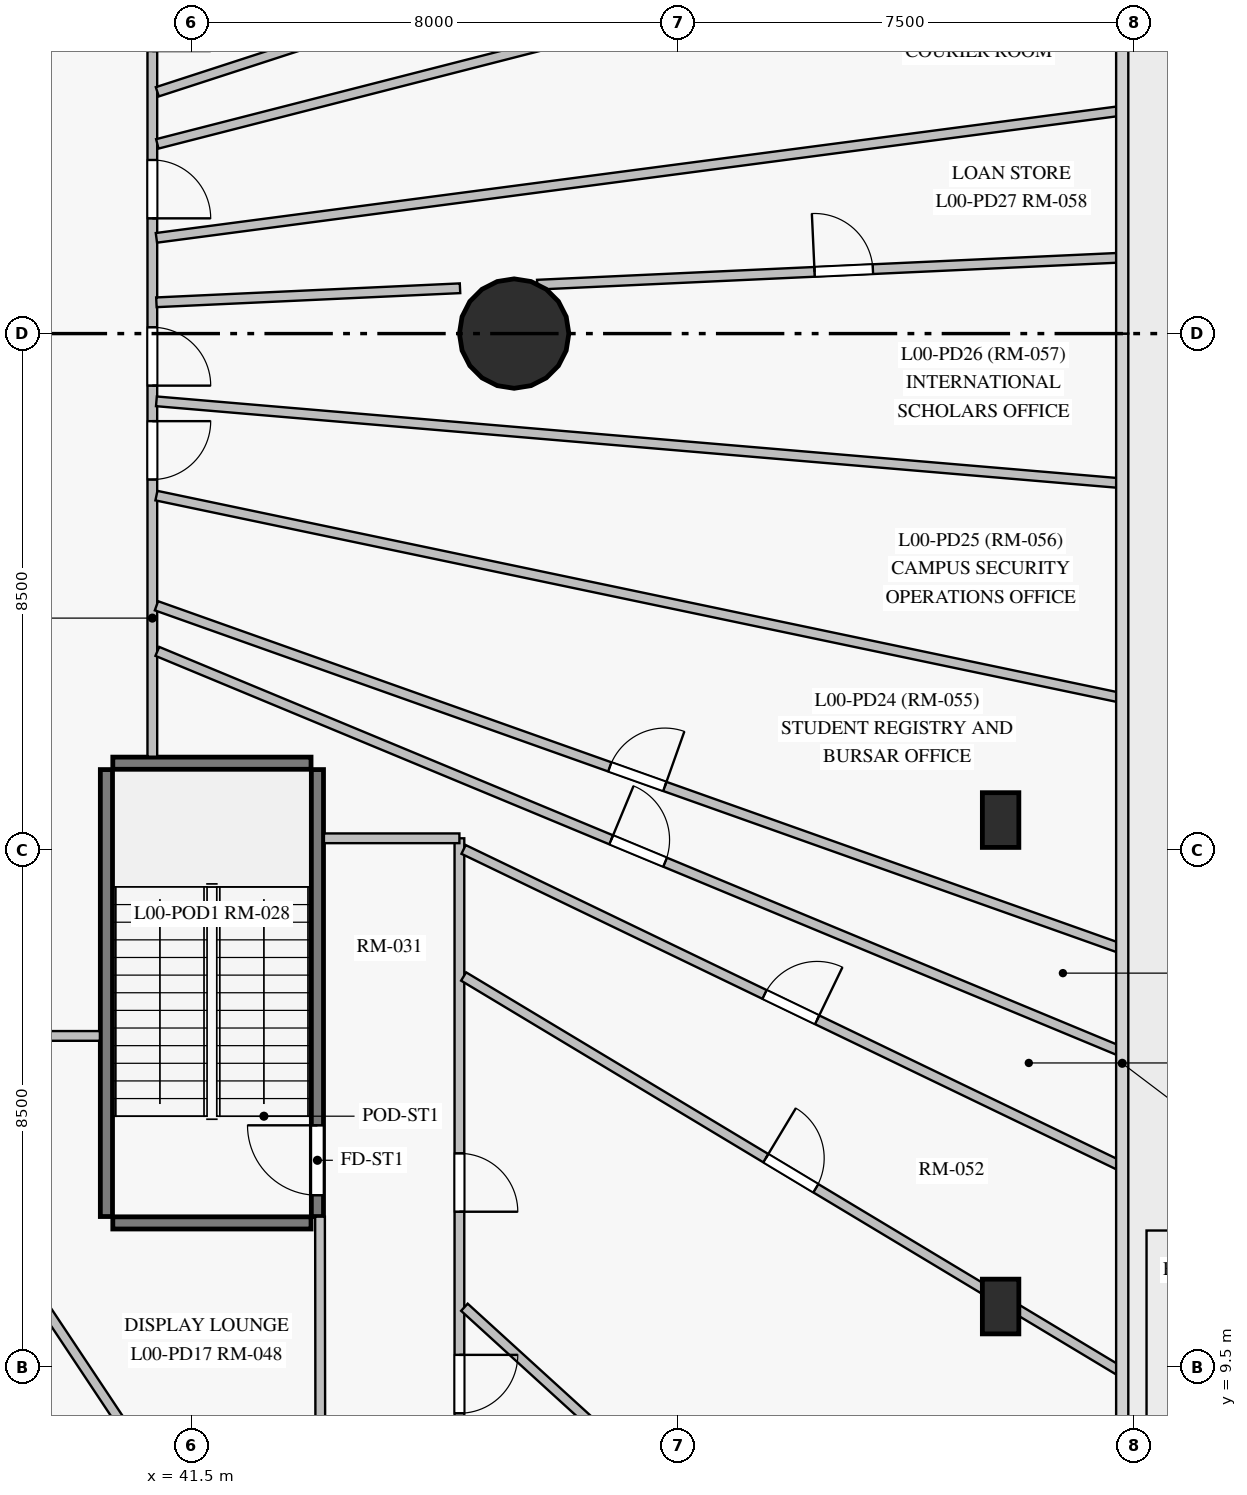
"""IFC4 building model, lengths in metres.
Left out: names, types, materials, properties, quantities, classifications, styles, units other than length and angle.
Written with IfcOpenShell. Run it as: python <this file> out.ifc"""

import sys

from ifc_helpers import new_model, si_unit, direction, frame, frame_2d, origin, origin_with_axes, origin_2d, place, context, subcontext, project, spatial, rectangle, circle, extrude, source, transform, mapped, element, fill, save


model = new_model("IFC4")
c1 = context("Model", 3, precision=1e-05, world=origin(), true_north=direction((0.0, 1.0)))
c2 = subcontext(c1, "Body", "Model", "MODEL_VIEW")
j1 = project(units=[si_unit("LENGTHUNIT", "METRE"), si_unit("PLANEANGLEUNIT", "RADIAN")], contexts=[c1])
p1 = place(None, origin())
s1 = spatial("IfcSite", under=j1, at=p1, CompositionType="ELEMENT")
p2 = place(p1, origin())
s2 = spatial("IfcBuilding", under=s1, at=p2, CompositionType="ELEMENT")
p3 = place(p2, origin())
s3 = spatial("IfcBuildingStorey", under=s2, at=p3, CompositionType="ELEMENT", Elevation=0.0)
m1 = source(origin_with_axes(), c2, "Body", "SweptSolid", [
    extrude(circle(Radius=0.9, at=origin_2d()), origin(), (0.0, 0.0, 1.0), 4.5),
])
p4 = place(p3, frame((46.8, 26.5, 0.0), z_axis=(0.0, 0.0, 1.0), x_axis=(1.0, 0.0, 0.0)))
e1 = element("IfcColumn", 1, at=p4, inside=s3, PredefinedType="COLUMN", context=c2, shape_type="MappedRepresentation", body=[
    mapped(m1, transform((0.0, 0.0, 0.0), scale=1.0)),
])
m2 = source(origin_with_axes(), c2, "Body", "SweptSolid", [
    extrude(rectangle(XDim=0.6, YDim=0.9, at=origin_2d()), origin(), (0.0, 0.0, 1.0), 4.5),
])
for number, where, z_axis, x_axis in (
    (2, (54.8, 10.5, 0.0), (0.0, 0.0, 1.0), (1.0, 0.0, 0.0)),
    (3, (54.8, 18.5, 0.0), (0.0, 0.0, 1.0), (1.0, 0.0, 0.0)),
):
    element("IfcColumn", number, at=place(p3, frame(where, z_axis=z_axis, x_axis=x_axis)), inside=s3, PredefinedType="PILASTER", context=c2, shape_type="MappedRepresentation", body=[
        mapped(m2, transform((0.0, 0.0, 0.0), scale=1.0)),
    ])
p5 = place(p3, frame((40.095, 11.98, 0.0), z_axis=(0.0, 0.0, 1.0), x_axis=(0.0, 1.0, 0.0)))
e4 = element("IfcWall", 4, at=p5, inside=s3, PredefinedType="SHEAR", context=c2, shape_type="SweptSolid", body=[
    extrude(rectangle(XDim=7.35, YDim=0.2, at=frame_2d((3.675, 0.0))), origin(), (0.0, 0.0, 1.0), 4.2),
])
p6 = place(p3, frame((43.565, 11.98, 0.0), z_axis=(0.0, 0.0, 1.0), x_axis=(0.0, 1.0, 0.0)))
e5 = element("IfcWall", 5, at=p6, inside=s3, PredefinedType="SHEAR", context=c2, shape_type="SweptSolid", body=[
    extrude(rectangle(XDim=7.35, YDim=0.2, at=frame_2d((3.675, 0.0))), origin(), (0.0, 0.0, 1.0), 4.2),
])
p7 = place(p6, frame((0.35, 0.0, 0.0)))
e6 = element("IfcOpeningElement", 6, at=p7, cuts=e5, PredefinedType="OPENING", context=c2, shape_type="SweptSolid", body=[
    extrude(rectangle(XDim=1.15, YDim=2.15, at=frame_2d((0.575, 1.075))), frame((0.0, 0.11, 0.0), z_axis=(0.0, -1.0, 0.0), x_axis=(1.0, 0.0, 0.0)), (0.0, 0.0, 1.0), 0.22),
])
for number, where, z_axis, x_axis in (
    (7, (40.2, 11.875, 0.0), (0.0, 0.0, 1.0), (1.0, 0.0, 0.0)),
    (8, (40.2, 19.435, 0.0), (0.0, 0.0, 1.0), (1.0, 0.0, 0.0)),
):
    element("IfcWall", number, at=place(p3, frame(where, z_axis=z_axis, x_axis=x_axis)), inside=s3, PredefinedType="SHEAR", context=c2, shape_type="SweptSolid", body=[
        extrude(rectangle(XDim=3.26, YDim=0.2, at=frame_2d((1.63, 0.0))), origin(), (0.0, 0.0, 1.0), 4.2),
    ])
p8 = place(p3, frame((40.85, 38.05, 0.0), z_axis=(0.0, 0.0, 1.0), x_axis=(0.0, -1.0, 0.0)))
e9 = element("IfcWall", 9, at=p8, inside=s3, PredefinedType="PARTITIONING", context=c2, shape_type="SweptSolid", body=[
    extrude(rectangle(XDim=18.508, YDim=0.16, at=frame_2d((9.254, 0.0))), origin(), (0.0, 0.0, 1.0), 3.25),
])
p9 = place(p8, frame((12.99, 0.0, 0.0)))
e10 = element("IfcOpeningElement", 10, at=p9, cuts=e9, PredefinedType="OPENING", context=c2, shape_type="SweptSolid", body=[
    extrude(rectangle(XDim=0.96, YDim=2.15, at=frame_2d((0.48, 1.075))), frame((0.0, 0.09, 0.0), z_axis=(0.0, -1.0, 0.0), x_axis=(1.0, 0.0, 0.0)), (0.0, 0.0, 1.0), 0.18),
])
p10 = place(p8, frame((11.446, 0.0, 0.0)))
e11 = element("IfcOpeningElement", 11, at=p10, cuts=e9, PredefinedType="OPENING", context=c2, shape_type="SweptSolid", body=[
    extrude(rectangle(XDim=0.96, YDim=2.15, at=frame_2d((0.48, 1.075))), frame((0.0, 0.09, 0.0), z_axis=(0.0, -1.0, 0.0), x_axis=(1.0, 0.0, 0.0)), (0.0, 0.0, 1.0), 0.18),
])
p11 = place(p8, frame((8.695, 0.0, 0.0)))
e12 = element("IfcOpeningElement", 12, at=p11, cuts=e9, PredefinedType="OPENING", context=c2, shape_type="SweptSolid", body=[
    extrude(rectangle(XDim=0.96, YDim=2.15, at=frame_2d((0.48, 1.075))), frame((0.0, 0.09, 0.0), z_axis=(0.0, -1.0, 0.0), x_axis=(1.0, 0.0, 0.0)), (0.0, 0.0, 1.0), 0.18),
])
p12 = place(p8, frame((5.944, 0.0, 0.0)))
e13 = element("IfcOpeningElement", 13, at=p12, cuts=e9, PredefinedType="OPENING", context=c2, shape_type="SweptSolid", body=[
    extrude(rectangle(XDim=0.96, YDim=2.15, at=frame_2d((0.48, 1.075))), frame((0.0, 0.09, 0.0), z_axis=(0.0, -1.0, 0.0), x_axis=(1.0, 0.0, 0.0)), (0.0, 0.0, 1.0), 0.18),
])
p13 = place(p8, frame((2.72, 0.0, 0.0)))
e14 = element("IfcOpeningElement", 14, at=p13, cuts=e9, PredefinedType="OPENING", context=c2, shape_type="SweptSolid", body=[
    extrude(rectangle(XDim=0.96, YDim=2.15, at=frame_2d((0.48, 1.075))), frame((0.0, 0.09, 0.0), z_axis=(0.0, -1.0, 0.0), x_axis=(1.0, 0.0, 0.0)), (0.0, 0.0, 1.0), 0.18),
])
p14 = place(p3, frame((40.932, 21.274, 0.0), z_axis=(0.0, 0.0, 1.0), x_axis=(0.923573591062, -0.383421206889, 0.0)))
e15 = element("IfcWall", 15, at=p14, inside=s3, PredefinedType="PARTITIONING", context=c2, shape_type="SweptSolid", body=[
    extrude(rectangle(XDim=17.149, YDim=0.16, at=frame_2d((8.574, 0.0))), origin(), (0.0, 0.0, 1.0), 4.2),
])
p15 = place(p14, frame((8.082, 0.0, 0.0)))
e16 = element("IfcOpeningElement", 16, at=p15, cuts=e15, PredefinedType="OPENING", context=c2, shape_type="SweptSolid", body=[
    extrude(rectangle(XDim=0.96, YDim=2.15, at=frame_2d((0.48, 1.075))), frame((0.0, 0.09, 0.0), z_axis=(0.0, -1.0, 0.0), x_axis=(1.0, 0.0, 0.0)), (0.0, 0.0, 1.0), 0.18),
])
p16 = place(p3, frame((40.918, 22.024, 0.0), z_axis=(0.0, 0.0, 1.0), x_axis=(0.942274220907, -0.334842190613, 0.0)))
e17 = element("IfcWall", 17, at=p16, inside=s3, PredefinedType="PARTITIONING", context=c2, shape_type="SweptSolid", body=[
    extrude(rectangle(XDim=16.824, YDim=0.16, at=frame_2d((8.412, 0.0))), origin(), (0.0, 0.0, 1.0), 4.2),
])
p17 = place(p16, frame((7.912, 0.0, 0.0)))
e18 = element("IfcOpeningElement", 18, at=p17, cuts=e17, PredefinedType="OPENING", context=c2, shape_type="SweptSolid", body=[
    extrude(rectangle(XDim=0.96, YDim=2.15, at=frame_2d((0.48, 1.075))), frame((0.0, 0.09, 0.0), z_axis=(0.0, -1.0, 0.0), x_axis=(1.0, 0.0, 0.0)), (0.0, 0.0, 1.0), 0.18),
])
p18 = place(p3, frame((40.932, 30.476, 0.0), z_axis=(0.0, 0.0, 1.0), x_axis=(0.951055611127, 0.309019780181, 0.0)))
e19 = element("IfcWall", 19, at=p18, inside=s3, PredefinedType="PARTITIONING", context=c2, shape_type="SweptSolid", body=[
    extrude(rectangle(XDim=16.655, YDim=0.16, at=frame_2d((8.328, 0.0))), origin(), (0.0, 0.0, 1.0), 3.7),
])
p19 = place(p3, frame((40.932, 29.62, 0.0), z_axis=(0.0, 0.0, 1.0), x_axis=(0.968775770521, 0.247938513451, 0.0)))
e20 = element("IfcWall", 20, at=p19, inside=s3, PredefinedType="PARTITIONING", context=c2, shape_type="SweptSolid", body=[
    extrude(rectangle(XDim=16.352, YDim=0.16, at=frame_2d((8.176, 0.0))), origin(), (0.0, 0.0, 1.0), 3.7),
])
p20 = place(p19, frame((7.683, 0.0, 0.0)))
e21 = element("IfcOpeningElement", 21, at=p20, cuts=e20, PredefinedType="OPENING", context=c2, shape_type="SweptSolid", body=[
    extrude(rectangle(XDim=0.96, YDim=2.15, at=frame_2d((0.48, 1.075))), frame((0.0, 0.09, 0.0), z_axis=(0.0, -1.0, 0.0), x_axis=(1.0, 0.0, 0.0)), (0.0, 0.0, 1.0), 0.18),
])
p21 = place(p3, frame((45.9, 18.2, 0.0), z_axis=(0.0, 0.0, 1.0), x_axis=(0.0, -1.0, 0.0)))
e22 = element("IfcWall", 22, at=p21, inside=s3, PredefinedType="PARTITIONING", context=c2, shape_type="SweptSolid", body=[
    extrude(rectangle(XDim=16.235, YDim=0.16, at=frame_2d((8.117, 0.0))), origin(), (0.0, 0.0, 1.0), 4.2),
])
p22 = place(p21, frame((11.935, 0.0, 0.0)))
e23 = element("IfcOpeningElement", 23, at=p22, cuts=e22, PredefinedType="OPENING", context=c2, shape_type="SweptSolid", body=[
    extrude(rectangle(XDim=0.96, YDim=2.15, at=frame_2d((0.48, 1.075))), frame((0.0, 0.09, 0.0), z_axis=(0.0, -1.0, 0.0), x_axis=(1.0, 0.0, 0.0)), (0.0, 0.0, 1.0), 0.18),
])
p23 = place(p21, frame((8.495, 0.0, 0.0)))
e24 = element("IfcOpeningElement", 24, at=p23, cuts=e22, PredefinedType="OPENING", context=c2, shape_type="SweptSolid", body=[
    extrude(rectangle(XDim=0.96, YDim=2.15, at=frame_2d((0.48, 1.075))), frame((0.0, 0.09, 0.0), z_axis=(0.0, -1.0, 0.0), x_axis=(1.0, 0.0, 0.0)), (0.0, 0.0, 1.0), 0.18),
])
p24 = place(p21, frame((5.181, 0.0, 0.0)))
e25 = element("IfcOpeningElement", 25, at=p24, cuts=e22, PredefinedType="OPENING", context=c2, shape_type="SweptSolid", body=[
    extrude(rectangle(XDim=0.96, YDim=2.15, at=frame_2d((0.48, 1.075))), frame((0.0, 0.09, 0.0), z_axis=(0.0, -1.0, 0.0), x_axis=(1.0, 0.0, 0.0)), (0.0, 0.0, 1.0), 0.18),
])
p25 = place(p3, frame((40.917, 23.835, 0.0), z_axis=(0.0, 0.0, 1.0), x_axis=(0.978723393047, -0.205184112209, 0.0)))
e26 = element("IfcWall", 26, at=p25, inside=s3, PredefinedType="PARTITIONING", context=c2, shape_type="SweptSolid", body=[
    extrude(rectangle(XDim=16.201, YDim=0.16, at=frame_2d((8.101, 0.0))), origin(), (0.0, 0.0, 1.0), 3.7),
])
p26 = place(p3, frame((40.917, 28.074, 0.0), z_axis=(0.0, 0.0, 1.0), x_axis=(0.991445045126, 0.130524796478, 0.0)))
e27 = element("IfcWall", 27, at=p26, inside=s3, PredefinedType="PARTITIONING", context=c2, shape_type="SweptSolid", body=[
    extrude(rectangle(XDim=15.994, YDim=0.16, at=frame_2d((7.997, 0.0))), origin(), (0.0, 0.0, 1.0), 3.7),
])
p27 = place(p3, frame((40.917, 25.386, 0.0), z_axis=(0.0, 0.0, 1.0), x_axis=(0.996417423624, -0.084571377535, 0.0)))
e28 = element("IfcWall", 28, at=p27, inside=s3, PredefinedType="PARTITIONING", context=c2, shape_type="SweptSolid", body=[
    extrude(rectangle(XDim=15.915, YDim=0.16, at=frame_2d((7.958, 0.0))), origin(), (0.0, 0.0, 1.0), 3.7),
])
p28 = place(p3, frame((34.032, 14.868, 0.0), z_axis=(0.0, 0.0, 1.0), x_axis=(0.433724291506, -0.901045636445, 0.0)))
e29 = element("IfcWall", 29, at=p28, inside=s3, PredefinedType="PARTITIONING", context=c2, shape_type="SweptSolid", body=[
    extrude(rectangle(XDim=14.468, YDim=0.16, at=frame_2d((7.234, 0.0))), origin(), (0.0, 0.0, 1.0), 4.2),
])
p29 = place(p3, frame((39.988, 14.95, 0.0), z_axis=(0.0, 0.0, 1.0), x_axis=(-1.0, 0.0, 0.0)))
e30 = element("IfcWall", 30, at=p29, inside=s3, PredefinedType="PARTITIONING", context=c2, shape_type="SweptSolid", body=[
    extrude(rectangle(XDim=14.388, YDim=0.16, at=frame_2d((7.194, 0.0))), origin(), (0.0, 0.0, 1.0), 4.2),
])
p30 = place(p29, frame((10.19, 0.0, 0.0)))
e31 = element("IfcOpeningElement", 31, at=p30, cuts=e30, PredefinedType="OPENING", context=c2, shape_type="SweptSolid", body=[
    extrude(rectangle(XDim=0.96, YDim=2.15, at=frame_2d((0.48, 1.075))), frame((0.0, 0.09, 0.0), z_axis=(0.0, -1.0, 0.0), x_axis=(1.0, 0.0, 0.0)), (0.0, 0.0, 1.0), 0.18),
])
p31 = place(p29, frame((6.878, 0.0, 0.0)))
e32 = element("IfcOpeningElement", 32, at=p31, cuts=e30, PredefinedType="OPENING", context=c2, shape_type="SweptSolid", body=[
    extrude(rectangle(XDim=0.96, YDim=2.15, at=frame_2d((0.48, 1.075))), frame((0.0, 0.09, 0.0), z_axis=(0.0, -1.0, 0.0), x_axis=(1.0, 0.0, 0.0)), (0.0, 0.0, 1.0), 0.18),
])
p32 = place(p29, frame((4.595, 0.0, 0.0)))
e33 = element("IfcOpeningElement", 33, at=p32, cuts=e30, PredefinedType="OPENING", context=c2, shape_type="SweptSolid", body=[
    extrude(rectangle(XDim=0.96, YDim=2.15, at=frame_2d((0.48, 1.075))), frame((0.0, 0.09, 0.0), z_axis=(0.0, -1.0, 0.0), x_axis=(1.0, 0.0, 0.0)), (0.0, 0.0, 1.0), 0.18),
])
p33 = place(p29, frame((2.312, 0.0, 0.0)))
e34 = element("IfcOpeningElement", 34, at=p33, cuts=e30, PredefinedType="OPENING", context=c2, shape_type="SweptSolid", body=[
    extrude(rectangle(XDim=0.96, YDim=2.15, at=frame_2d((0.48, 1.075))), frame((0.0, 0.09, 0.0), z_axis=(0.0, -1.0, 0.0), x_axis=(1.0, 0.0, 0.0)), (0.0, 0.0, 1.0), 0.18),
])
p34 = place(p3, frame((36.156, 14.881, 0.0), z_axis=(0.0, 0.0, 1.0), x_axis=(0.553761322164, -0.832675445822, 0.0)))
e35 = element("IfcWall", 35, at=p34, inside=s3, PredefinedType="PARTITIONING", context=c2, shape_type="SweptSolid", body=[
    extrude(rectangle(XDim=13.327, YDim=0.16, at=frame_2d((6.664, 0.0))), origin(), (0.0, 0.0, 1.0), 4.2),
])
p35 = place(p3, frame((45.982, 10.488, 0.0), z_axis=(0.0, 0.0, 1.0), x_axis=(0.73914139053, -0.673550298646, 0.0)))
e36 = element("IfcWall", 36, at=p35, inside=s3, PredefinedType="PARTITIONING", context=c2, shape_type="SweptSolid", body=[
    extrude(rectangle(XDim=12.83, YDim=0.16, at=frame_2d((6.415, 0.0))), origin(), (0.0, 0.0, 1.0), 4.2),
])
p36 = place(p3, frame((45.969, 15.927, 0.0), z_axis=(0.0, 0.0, 1.0), x_axis=(0.857034319892, -0.515259327453, 0.0)))
e37 = element("IfcWall", 37, at=p36, inside=s3, PredefinedType="PARTITIONING", context=c2, shape_type="SweptSolid", body=[
    extrude(rectangle(XDim=12.598, YDim=0.16, at=frame_2d((6.299, 0.0))), origin(), (0.0, 0.0, 1.0), 4.2),
])
p37 = place(p36, frame((5.799, 0.0, 0.0)))
e38 = element("IfcOpeningElement", 38, at=p37, cuts=e37, PredefinedType="OPENING", context=c2, shape_type="SweptSolid", body=[
    extrude(rectangle(XDim=0.96, YDim=2.15, at=frame_2d((0.48, 1.075))), frame((0.0, 0.09, 0.0), z_axis=(0.0, -1.0, 0.0), x_axis=(1.0, 0.0, 0.0)), (0.0, 0.0, 1.0), 0.18),
])
p38 = place(p3, frame((45.969, 18.017, 0.0), z_axis=(0.0, 0.0, 1.0), x_axis=(0.900884595161, -0.434058689813, 0.0)))
e39 = element("IfcWall", 39, at=p38, inside=s3, PredefinedType="PARTITIONING", context=c2, shape_type="SweptSolid", body=[
    extrude(rectangle(XDim=11.988, YDim=0.16, at=frame_2d((5.994, 0.0))), origin(), (0.0, 0.0, 1.0), 4.2),
])
p39 = place(p38, frame((5.494, 0.0, 0.0)))
e40 = element("IfcOpeningElement", 40, at=p39, cuts=e39, PredefinedType="OPENING", context=c2, shape_type="SweptSolid", body=[
    extrude(rectangle(XDim=0.96, YDim=2.15, at=frame_2d((0.48, 1.075))), frame((0.0, 0.09, 0.0), z_axis=(0.0, -1.0, 0.0), x_axis=(1.0, 0.0, 0.0)), (0.0, 0.0, 1.0), 0.18),
])
p40 = place(p3, frame((43.62, 1.965, 0.0), z_axis=(0.0, 0.0, 1.0), x_axis=(-0.001219154463, 0.999999256831, 0.0)))
e41 = element("IfcWall", 41, at=p40, inside=s3, PredefinedType="PARTITIONING", context=c2, shape_type="SweptSolid", body=[
    extrude(rectangle(XDim=10.013, YDim=0.16, at=frame_2d((5.006, 0.0))), origin(), (0.0, 0.0, 1.0), 4.2),
])
p41 = place(p40, frame((4.305, 0.0, 0.0)))
e42 = element("IfcOpeningElement", 42, at=p41, cuts=e41, PredefinedType="OPENING", context=c2, shape_type="SweptSolid", body=[
    extrude(rectangle(XDim=0.96, YDim=2.15, at=frame_2d((0.48, 1.075))), frame((0.0, 0.09, 0.0), z_axis=(0.0, -1.0, 0.0), x_axis=(1.0, 0.0, 0.0)), (0.0, 0.0, 1.0), 0.18),
])
p42 = place(p3, frame((47.18, 27.304, 0.0), z_axis=(0.0, 0.0, 1.0), x_axis=(0.998931741593, 0.04621012484, 0.0)))
e43 = element("IfcWall", 43, at=p42, inside=s3, PredefinedType="PARTITIONING", context=c2, shape_type="SweptSolid", body=[
    extrude(rectangle(XDim=9.605, YDim=0.16, at=frame_2d((4.802, 0.0))), origin(), (0.0, 0.0, 1.0), 3.7),
])
p43 = place(p42, frame((4.565, 0.0, 0.0)))
e44 = element("IfcOpeningElement", 44, at=p43, cuts=e43, PredefinedType="OPENING", context=c2, shape_type="SweptSolid", body=[
    extrude(rectangle(XDim=0.96, YDim=2.15, at=frame_2d((0.48, 1.075))), frame((0.0, 0.09, 0.0), z_axis=(0.0, -1.0, 0.0), x_axis=(1.0, 0.0, 0.0)), (0.0, 0.0, 1.0), 0.18),
])
p44 = place(p3, frame((40.917, 27.014, 0.0), z_axis=(0.0, 0.0, 1.0), x_axis=(0.998931863104, 0.046207498044, 0.0)))
e45 = element("IfcWall", 45, at=p44, inside=s3, PredefinedType="PARTITIONING", context=c2, shape_type="SweptSolid", body=[
    extrude(rectangle(XDim=4.998, YDim=0.16, at=frame_2d((2.499, 0.0))), origin(), (0.0, 0.0, 1.0), 3.25),
])
p45 = place(p3, frame((43.672, 18.2, 0.0), z_axis=(0.0, 0.0, 1.0), x_axis=(1.0, 0.0, 0.0)))
e46 = element("IfcWall", 46, at=p45, inside=s3, PredefinedType="PARTITIONING", context=c2, shape_type="SweptSolid", body=[
    extrude(rectangle(XDim=2.228, YDim=0.16, at=frame_2d((1.114, 0.0))), origin(), (0.0, 0.0, 1.0), 4.2),
])
m3 = source(origin_with_axes(), c2, "Body", "SweptSolid", [
    extrude(rectangle(XDim=1.15, YDim=2.15, at=frame_2d((0.575, 1.075))), frame((0.0, 0.025, 0.0), z_axis=(0.0, -1.0, 0.0), x_axis=(1.0, 0.0, 0.0)), (0.0, 0.0, 1.0), 0.05),
])
p46 = place(p7, origin())
e47 = element("IfcDoor", 47, at=p46, inside=s3, OperationType="SINGLE_SWING_RIGHT", PredefinedType="DOOR", context=c2, shape_type="MappedRepresentation", body=[
    mapped(m3, transform((0.0, 0.0, 0.0), scale=1.0)),
])
fill(e6, e47)
m4 = source(origin_with_axes(), c2, "Body", "SweptSolid", [
    extrude(rectangle(XDim=0.96, YDim=2.15, at=frame_2d((0.48, 1.075))), frame((0.0, 0.025, 0.0), z_axis=(0.0, -1.0, 0.0), x_axis=(1.0, 0.0, 0.0)), (0.0, 0.0, 1.0), 0.05),
])
p47 = place(p23, origin())
e48 = element("IfcDoor", 48, at=p47, inside=s3, OperationType="SINGLE_SWING_LEFT", PredefinedType="DOOR", context=c2, shape_type="MappedRepresentation", body=[
    mapped(m4, transform((0.0, 0.0, 0.0), scale=1.0)),
])
fill(e24, e48)
p48 = place(p24, origin())
e49 = element("IfcDoor", 49, at=p48, inside=s3, OperationType="SINGLE_SWING_RIGHT", PredefinedType="DOOR", context=c2, shape_type="MappedRepresentation", body=[
    mapped(m4, transform((0.0, 0.0, 0.0), scale=1.0)),
])
fill(e25, e49)
p49 = place(p37, origin())
e50 = element("IfcDoor", 50, at=p49, inside=s3, OperationType="SINGLE_SWING_LEFT", PredefinedType="DOOR", context=c2, shape_type="MappedRepresentation", body=[
    mapped(m4, transform((0.0, 0.0, 0.0), scale=1.0)),
])
fill(e38, e50)
p50 = place(p39, origin())
e51 = element("IfcDoor", 51, at=p50, inside=s3, OperationType="SINGLE_SWING_RIGHT", PredefinedType="DOOR", context=c2, shape_type="MappedRepresentation", body=[
    mapped(m4, transform((0.0, 0.0, 0.0), scale=1.0)),
])
fill(e40, e51)
p51 = place(p15, origin())
e52 = element("IfcDoor", 52, at=p51, inside=s3, OperationType="SINGLE_SWING_LEFT", PredefinedType="DOOR", context=c2, shape_type="MappedRepresentation", body=[
    mapped(m4, transform((0.0, 0.0, 0.0), scale=1.0)),
])
fill(e16, e52)
p52 = place(p17, origin())
e53 = element("IfcDoor", 53, at=p52, inside=s3, OperationType="SINGLE_SWING_RIGHT", PredefinedType="DOOR", context=c2, shape_type="MappedRepresentation", body=[
    mapped(m4, transform((0.0, 0.0, 0.0), scale=1.0)),
])
fill(e18, e53)
p53 = place(p9, origin())
e54 = element("IfcDoor", 54, at=p53, inside=s3, OperationType="SINGLE_SWING_LEFT", PredefinedType="DOOR", context=c2, shape_type="MappedRepresentation", body=[
    mapped(m4, transform((0.0, 0.0, 0.0), scale=1.0)),
])
fill(e10, e54)
p54 = place(p10, origin())
e55 = element("IfcDoor", 55, at=p54, inside=s3, OperationType="SINGLE_SWING_RIGHT", PredefinedType="DOOR", context=c2, shape_type="MappedRepresentation", body=[
    mapped(m4, transform((0.0, 0.0, 0.0), scale=1.0)),
])
fill(e11, e55)
p55 = place(p43, origin())
e56 = element("IfcDoor", 56, at=p55, inside=s3, OperationType="SINGLE_SWING_LEFT", PredefinedType="DOOR", context=c2, shape_type="MappedRepresentation", body=[
    mapped(m4, transform((0.0, 0.0, 0.0), scale=1.0)),
])
fill(e44, e56)
p56 = place(p11, origin())
e57 = element("IfcDoor", 57, at=p56, inside=s3, OperationType="SINGLE_SWING_RIGHT", PredefinedType="DOOR", context=c2, shape_type="MappedRepresentation", body=[
    mapped(m4, transform((0.0, 0.0, 0.0), scale=1.0)),
])
fill(e12, e57)
save(model, sys.argv[1])
